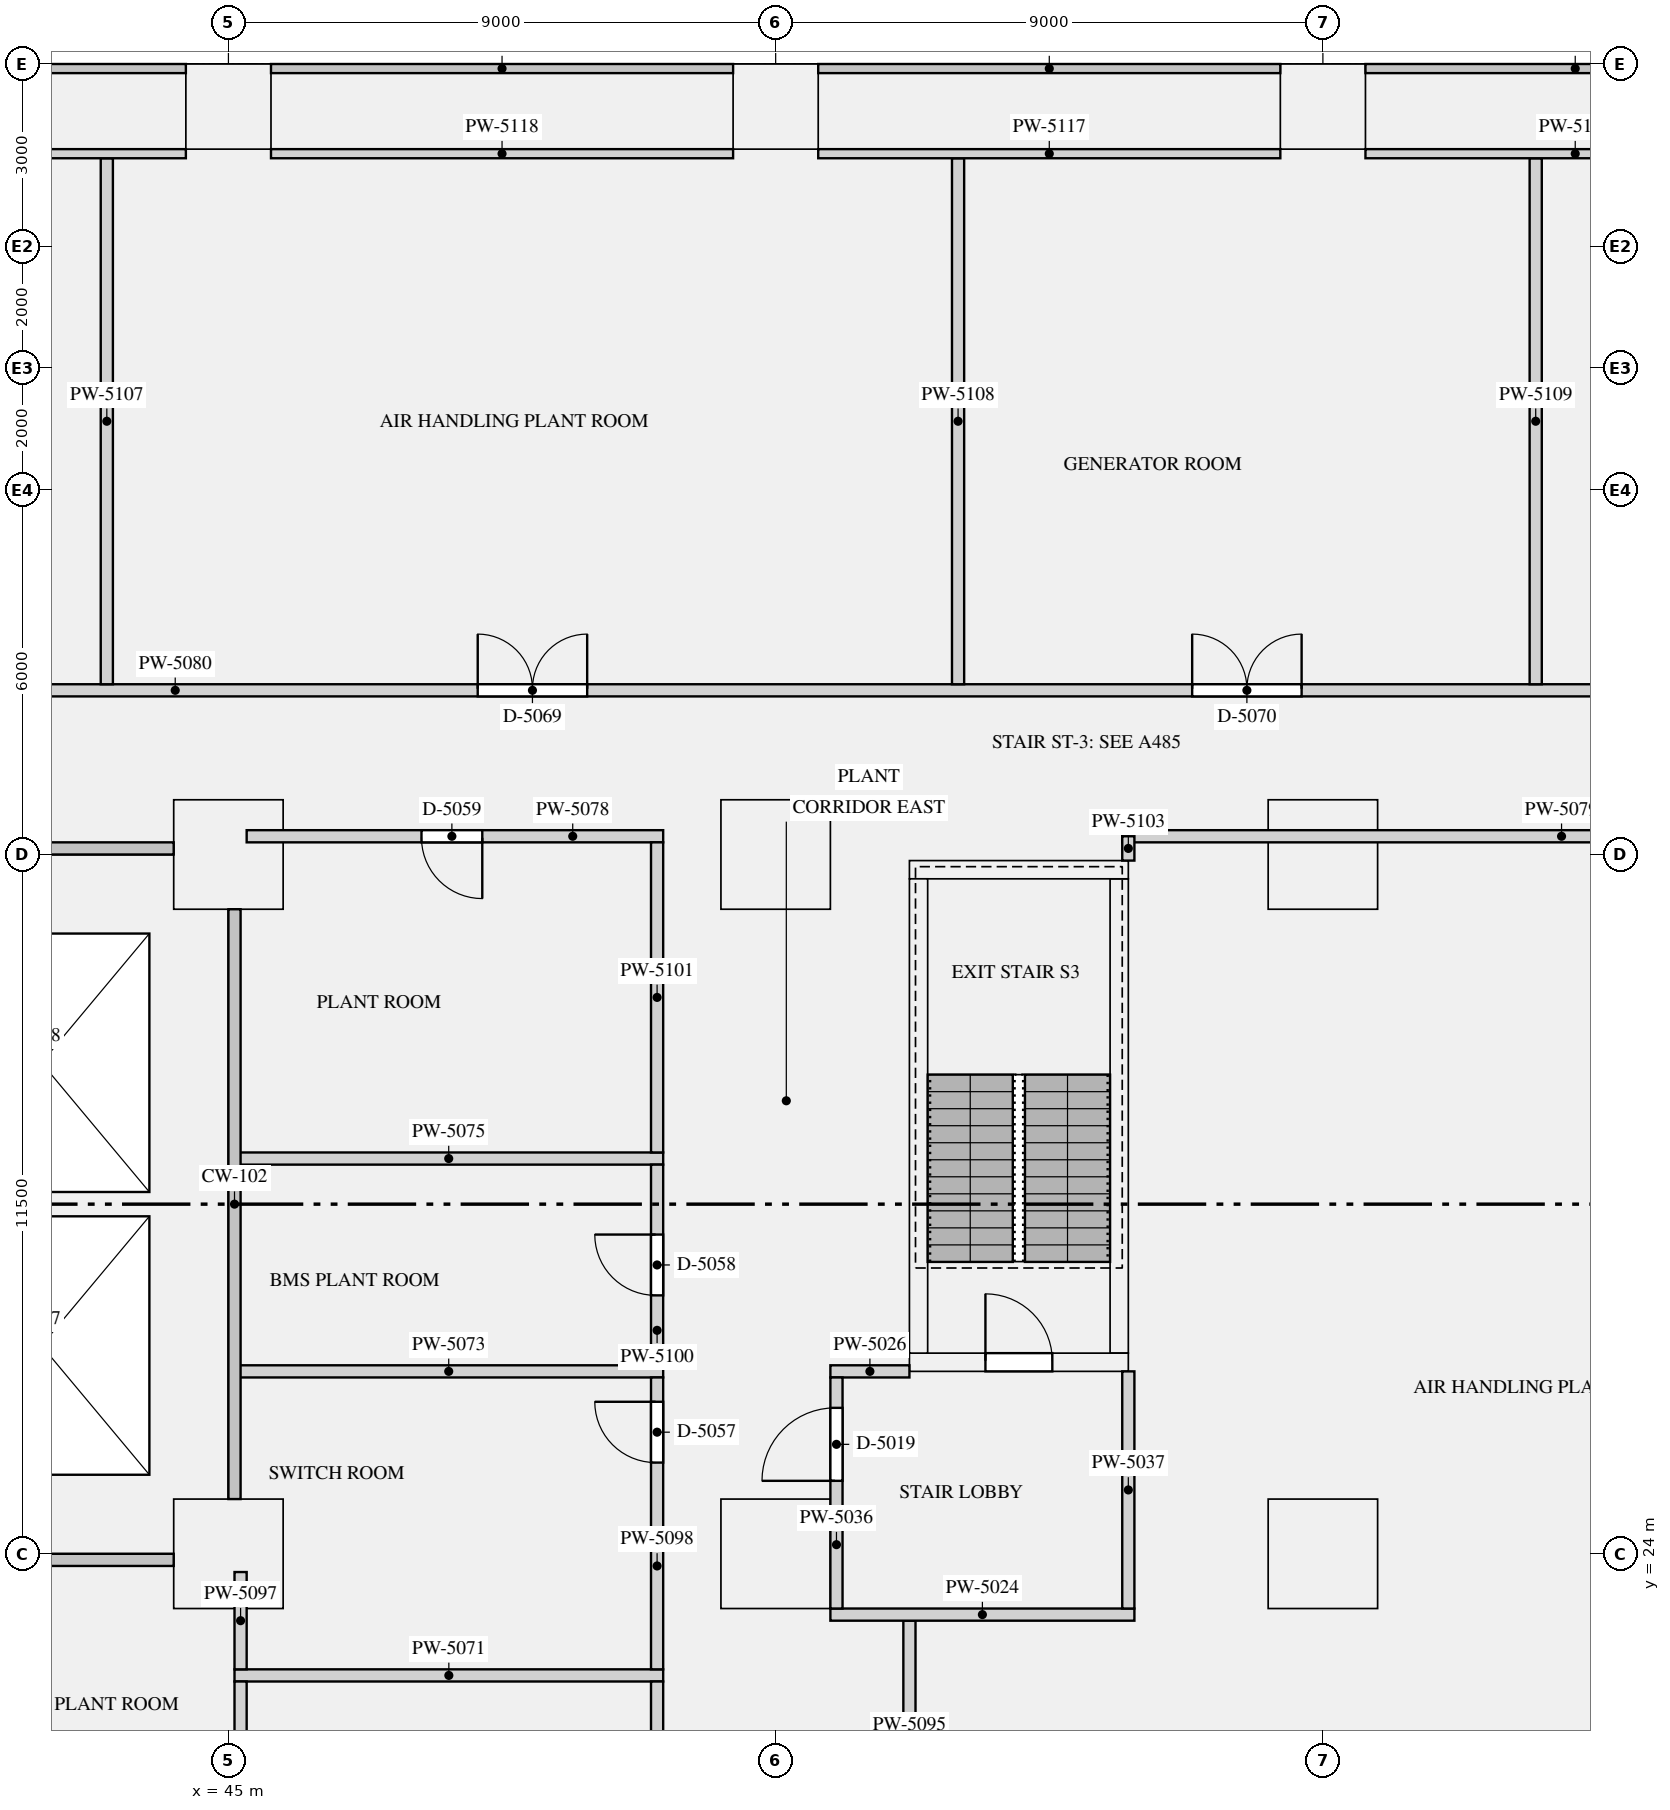
"""IFC4 building model, lengths in metres.
Left out: names, types, materials, properties, quantities, classifications, styles, units other than length and angle.
Written with IfcOpenShell. Run it as: python <this file> out.ifc"""

import sys

from ifc_helpers import new_model, si_unit, direction, frame, frame_2d, origin, origin_2d, place, context, subcontext, project, spatial, rectangle, extrude, element, fill, save


model = new_model("IFC4")
c1 = context("Model", 3, precision=1e-05, world=origin(), true_north=direction((0.0, 1.0)))
c2 = subcontext(c1, "Body", "Model", "MODEL_VIEW")
j1 = project(units=[si_unit("LENGTHUNIT", "METRE"), si_unit("PLANEANGLEUNIT", "RADIAN")], contexts=[c1])
p1 = place(None, origin())
s1 = spatial("IfcSite", under=j1, at=p1, CompositionType="ELEMENT")
p2 = place(p1, origin())
s2 = spatial("IfcBuilding", under=s1, at=p2, CompositionType="ELEMENT")
p3 = place(p2, frame((0.0, 0.0, 15.5)))
s3 = spatial("IfcBuildingStorey", under=s2, at=p3, CompositionType="ELEMENT", Elevation=15.5)
for number, where, z_axis, x_axis in (
    (1, (63.0, 47.8, 0.0), (0.0, 0.0, 1.0), (-1.0, 0.0, 0.0)),
    (2, (54.0, 47.8, 0.0), (0.0, 0.0, 1.0), (-1.0, 0.0, 0.0)),
    (3, (45.0, 47.8, 0.0), (0.0, 0.0, 1.0), (-1.0, 0.0, 0.0)),
):
    element("IfcColumn", number, at=place(p3, frame(where, z_axis=z_axis, x_axis=x_axis)), inside=s3, PredefinedType="USERDEFINED", context=c2, shape_type="SweptSolid", body=[
        extrude(rectangle(XDim=1.4, YDim=1.4, at=origin_2d()), origin(), (0.0, 0.0, 1.0), 4.0),
    ])
for number, where, z_axis, x_axis in (
    (4, (45.0, 24.0, 0.0), (0.0, 0.0, 1.0), (1.0, 0.0, 0.0)),
    (5, (45.0, 35.5, 0.0), (0.0, 0.0, 1.0), (1.0, 0.0, 0.0)),
    (6, (54.0, 24.0, 0.0), (0.0, 0.0, 1.0), (1.0, 0.0, 0.0)),
    (7, (54.0, 35.5, 0.0), (0.0, 0.0, 1.0), (1.0, 0.0, 0.0)),
    (8, (63.0, 24.0, 0.0), (0.0, 0.0, 1.0), (1.0, 0.0, 0.0)),
    (9, (63.0, 35.5, 0.0), (0.0, 0.0, 1.0), (1.0, 0.0, 0.0)),
):
    element("IfcColumn", number, at=place(p3, frame(where, z_axis=z_axis, x_axis=x_axis)), inside=s3, PredefinedType="COLUMN", context=c2, shape_type="SweptSolid", body=[
        extrude(rectangle(XDim=1.8, YDim=1.8, at=origin_2d()), origin(), (0.0, 0.0, 1.0), 4.0),
    ])
p4 = place(p3, frame((56.2, 27.15, 0.0), z_axis=(0.0, 0.0, 1.0), x_axis=(1.0, 0.0, 0.0)))
e10 = element("IfcWall", 10, at=p4, inside=s3, PredefinedType="SHEAR", context=c2, shape_type="SweptSolid", body=[
    extrude(rectangle(XDim=3.6, YDim=0.3, at=frame_2d((1.8, 0.0))), origin(), (0.0, 0.0, 1.0), 4.0),
])
p5 = place(p4, frame((1.25, 0.0, 0.0)))
e11 = element("IfcOpeningElement", 11, at=p5, cuts=e10, PredefinedType="OPENING", context=c2, shape_type="SweptSolid", body=[
    extrude(rectangle(XDim=1.1, YDim=2.1, at=frame_2d((0.55, 1.05))), frame((0.0, 0.16, 0.0), z_axis=(0.0, -1.0, 0.0), x_axis=(1.0, 0.0, 0.0)), (0.0, 0.0, 1.0), 0.32),
])
p6 = place(p3, frame((56.2, 35.25, 0.0), z_axis=(0.0, 0.0, 1.0), x_axis=(1.0, 0.0, 0.0)))
e12 = element("IfcWall", 12, at=p6, inside=s3, PredefinedType="SHEAR", context=c2, shape_type="SweptSolid", body=[
    extrude(rectangle(XDim=3.6, YDim=0.3, at=frame_2d((1.8, 0.0))), origin(), (0.0, 0.0, 1.0), 4.0),
])
for number, where, z_axis, x_axis in (
    (13, (56.35, 27.3, 0.0), (0.0, 0.0, 1.0), (0.0, 1.0, 0.0)),
    (14, (59.65, 27.3, 0.0), (0.0, 0.0, 1.0), (0.0, 1.0, 0.0)),
):
    element("IfcWall", number, at=place(p3, frame(where, z_axis=z_axis, x_axis=x_axis)), inside=s3, PredefinedType="SHEAR", context=c2, shape_type="SweptSolid", body=[
        extrude(rectangle(XDim=7.8, YDim=0.3, at=frame_2d((3.9, 0.0))), origin(), (0.0, 0.0, 1.0), 4.0),
    ])
p7 = place(p3, frame((54.9, 23.0, 0.0), z_axis=(0.0, 0.0, 1.0), x_axis=(1.0, 0.0, 0.0)))
e15 = element("IfcWall", 15, at=p7, inside=s3, PredefinedType="PARTITIONING", context=c2, shape_type="SweptSolid", body=[
    extrude(rectangle(XDim=5.0, YDim=0.2, at=frame_2d((2.5, 0.0))), origin(), (0.0, 0.0, 1.0), 3.68),
])
p8 = place(p3, frame((54.9, 27.0, 0.0), z_axis=(0.0, 0.0, 1.0), x_axis=(1.0, 0.0, 0.0)))
e16 = element("IfcWall", 16, at=p8, inside=s3, PredefinedType="PARTITIONING", context=c2, shape_type="SweptSolid", body=[
    extrude(rectangle(XDim=1.3, YDim=0.2, at=frame_2d((0.65, 0.0))), origin(), (0.0, 0.0, 1.0), 3.68),
])
p9 = place(p3, frame((55.0, 23.1, 0.0), z_axis=(0.0, 0.0, 1.0), x_axis=(0.0, 1.0, 0.0)))
e17 = element("IfcWall", 17, at=p9, inside=s3, PredefinedType="PARTITIONING", context=c2, shape_type="SweptSolid", body=[
    extrude(rectangle(XDim=3.8, YDim=0.2, at=frame_2d((1.9, 0.0))), origin(), (0.0, 0.0, 1.0), 3.68),
])
p10 = place(p9, frame((2.1, 0.0, 0.0)))
e18 = element("IfcOpeningElement", 18, at=p10, cuts=e17, PredefinedType="OPENING", context=c2, shape_type="SweptSolid", body=[
    extrude(rectangle(XDim=1.2, YDim=2.1, at=frame_2d((0.6, 1.05))), frame((0.0, 0.11, 0.0), z_axis=(0.0, -1.0, 0.0), x_axis=(1.0, 0.0, 0.0)), (0.0, 0.0, 1.0), 0.22),
])
p11 = place(p3, frame((59.8, 23.1, 0.0), z_axis=(0.0, 0.0, 1.0), x_axis=(0.0, 1.0, 0.0)))
e19 = element("IfcWall", 19, at=p11, inside=s3, PredefinedType="PARTITIONING", context=c2, shape_type="SweptSolid", body=[
    extrude(rectangle(XDim=3.9, YDim=0.2, at=frame_2d((1.95, 0.0))), origin(), (0.0, 0.0, 1.0), 3.68),
])
p12 = place(p3, frame((45.1, 22.0, 0.0), z_axis=(0.0, 0.0, 1.0), x_axis=(1.0, 0.0, 0.0)))
e20 = element("IfcWall", 20, at=p12, inside=s3, PredefinedType="PARTITIONING", context=c2, shape_type="SweptSolid", body=[
    extrude(rectangle(XDim=7.05, YDim=0.2, at=frame_2d((3.525, 0.0))), origin(), (0.0, 0.0, 1.0), 3.68),
])
for number, where, z_axis, x_axis in (
    (21, (45.096, 27.0, 0.0), (0.0, 0.0, 1.0), (1.0, 0.0, 0.0)),
    (22, (45.096, 30.5, 0.0), (0.0, 0.0, 1.0), (1.0, 0.0, 0.0)),
):
    element("IfcWall", number, at=place(p3, frame(where, z_axis=z_axis, x_axis=x_axis)), inside=s3, PredefinedType="PARTITIONING", context=c2, shape_type="SweptSolid", body=[
        extrude(rectangle(XDim=7.054, YDim=0.2, at=frame_2d((3.527, 0.0))), origin(), (0.0, 0.0, 1.0), 3.68),
    ])
p13 = place(p3, frame((45.3, 35.8, 0.0), z_axis=(0.0, 0.0, 1.0), x_axis=(1.0, 0.0, 0.0)))
e23 = element("IfcWall", 23, at=p13, inside=s3, PredefinedType="PARTITIONING", context=c2, shape_type="SweptSolid", body=[
    extrude(rectangle(XDim=6.85, YDim=0.2, at=frame_2d((3.425, 0.0))), origin(), (0.0, 0.0, 1.0), 3.68),
])
p14 = place(p13, frame((2.875, 0.0, 0.0)))
e24 = element("IfcOpeningElement", 24, at=p14, cuts=e23, PredefinedType="OPENING", context=c2, shape_type="SweptSolid", body=[
    extrude(rectangle(XDim=1.0, YDim=2.1, at=frame_2d((0.5, 1.05))), frame((0.0, 0.11, 0.0), z_axis=(0.0, -1.0, 0.0), x_axis=(1.0, 0.0, 0.0)), (0.0, 0.0, 1.0), 0.22),
])
p15 = place(p3, frame((59.7, 35.8, 0.0), z_axis=(0.0, 0.0, 1.0), x_axis=(1.0, 0.0, 0.0)))
e25 = element("IfcWall", 25, at=p15, inside=s3, PredefinedType="PARTITIONING", context=c2, shape_type="SweptSolid", body=[
    extrude(rectangle(XDim=14.45, YDim=0.2, at=frame_2d((7.225, 0.0))), origin(), (0.0, 0.0, 1.0), 3.68),
])
p16 = place(p3, frame((2.35, 38.2, 0.0), z_axis=(0.0, 0.0, 1.0), x_axis=(1.0, 0.0, 0.0)))
e26 = element("IfcWall", 26, at=p16, inside=s3, PredefinedType="PARTITIONING", context=c2, shape_type="SweptSolid", body=[
    extrude(rectangle(XDim=71.8, YDim=0.2, at=frame_2d((35.9, 0.0))), origin(), (0.0, 0.0, 1.0), 3.68),
])
p17 = place(p16, frame((4.65, 0.0, 0.0)))
e27 = element("IfcOpeningElement", 27, at=p17, cuts=e26, PredefinedType="OPENING", context=c2, shape_type="SweptSolid", body=[
    extrude(rectangle(XDim=1.8, YDim=2.1, at=frame_2d((0.9, 1.05))), frame((0.0, 0.11, 0.0), z_axis=(0.0, -1.0, 0.0), x_axis=(1.0, 0.0, 0.0)), (0.0, 0.0, 1.0), 0.22),
])
p18 = place(p16, frame((16.25, 0.0, 0.0)))
e28 = element("IfcOpeningElement", 28, at=p18, cuts=e26, PredefinedType="OPENING", context=c2, shape_type="SweptSolid", body=[
    extrude(rectangle(XDim=1.8, YDim=2.1, at=frame_2d((0.9, 1.05))), frame((0.0, 0.11, 0.0), z_axis=(0.0, -1.0, 0.0), x_axis=(1.0, 0.0, 0.0)), (0.0, 0.0, 1.0), 0.22),
])
p19 = place(p16, frame((25.5, 0.0, 0.0)))
e29 = element("IfcOpeningElement", 29, at=p19, cuts=e26, PredefinedType="OPENING", context=c2, shape_type="SweptSolid", body=[
    extrude(rectangle(XDim=1.8, YDim=2.1, at=frame_2d((0.9, 1.05))), frame((0.0, 0.11, 0.0), z_axis=(0.0, -1.0, 0.0), x_axis=(1.0, 0.0, 0.0)), (0.0, 0.0, 1.0), 0.22),
])
p20 = place(p16, frame((35.0, 0.0, 0.0)))
e30 = element("IfcOpeningElement", 30, at=p20, cuts=e26, PredefinedType="OPENING", context=c2, shape_type="SweptSolid", body=[
    extrude(rectangle(XDim=1.8, YDim=2.1, at=frame_2d((0.9, 1.05))), frame((0.0, 0.11, 0.0), z_axis=(0.0, -1.0, 0.0), x_axis=(1.0, 0.0, 0.0)), (0.0, 0.0, 1.0), 0.22),
])
p21 = place(p16, frame((46.75, 0.0, 0.0)))
e31 = element("IfcOpeningElement", 31, at=p21, cuts=e26, PredefinedType="OPENING", context=c2, shape_type="SweptSolid", body=[
    extrude(rectangle(XDim=1.8, YDim=2.1, at=frame_2d((0.9, 1.05))), frame((0.0, 0.11, 0.0), z_axis=(0.0, -1.0, 0.0), x_axis=(1.0, 0.0, 0.0)), (0.0, 0.0, 1.0), 0.22),
])
p22 = place(p16, frame((58.5, 0.0, 0.0)))
e32 = element("IfcOpeningElement", 32, at=p22, cuts=e26, PredefinedType="OPENING", context=c2, shape_type="SweptSolid", body=[
    extrude(rectangle(XDim=1.8, YDim=2.1, at=frame_2d((0.9, 1.05))), frame((0.0, 0.11, 0.0), z_axis=(0.0, -1.0, 0.0), x_axis=(1.0, 0.0, 0.0)), (0.0, 0.0, 1.0), 0.22),
])
p23 = place(p16, frame((67.85, 0.0, 0.0)))
e33 = element("IfcOpeningElement", 33, at=p23, cuts=e26, PredefinedType="OPENING", context=c2, shape_type="SweptSolid", body=[
    extrude(rectangle(XDim=1.8, YDim=2.1, at=frame_2d((0.9, 1.05))), frame((0.0, 0.11, 0.0), z_axis=(0.0, -1.0, 0.0), x_axis=(1.0, 0.0, 0.0)), (0.0, 0.0, 1.0), 0.22),
])
for number, where, z_axis, x_axis in (
    (34, (45.2, 18.6, 0.0), (0.0, 0.0, 1.0), (0.0, 1.0, 0.0)),
    (35, (52.05, 18.6, 0.0), (0.0, 0.0, 1.0), (0.0, 1.0, 0.0)),
):
    element("IfcWall", number, at=place(p3, frame(where, z_axis=z_axis, x_axis=x_axis)), inside=s3, PredefinedType="PARTITIONING", context=c2, shape_type="SweptSolid", body=[
        extrude(rectangle(XDim=3.3, YDim=0.2, at=frame_2d((1.65, 0.0))), origin(), (0.0, 0.0, 1.0), 3.68),
    ])
p24 = place(p3, frame((56.2, 18.6, 0.0), z_axis=(0.0, 0.0, 1.0), x_axis=(0.0, 1.0, 0.0)))
e36 = element("IfcWall", 36, at=p24, inside=s3, PredefinedType="PARTITIONING", context=c2, shape_type="SweptSolid", body=[
    extrude(rectangle(XDim=4.3, YDim=0.2, at=frame_2d((2.15, 0.0))), origin(), (0.0, 0.0, 1.0), 3.68),
])
p25 = place(p3, frame((45.2, 22.1, 0.0), z_axis=(0.0, 0.0, 1.0), x_axis=(0.0, 1.0, 0.0)))
e37 = element("IfcWall", 37, at=p25, inside=s3, PredefinedType="PARTITIONING", context=c2, shape_type="SweptSolid", body=[
    extrude(rectangle(XDim=1.6, YDim=0.2, at=frame_2d((0.8, 0.0))), origin(), (0.0, 0.0, 1.0), 3.68),
])
p26 = place(p3, frame((52.05, 22.1, 0.0), z_axis=(0.0, 0.0, 1.0), x_axis=(0.0, 1.0, 0.0)))
e38 = element("IfcWall", 38, at=p26, inside=s3, PredefinedType="PARTITIONING", context=c2, shape_type="SweptSolid", body=[
    extrude(rectangle(XDim=4.8, YDim=0.2, at=frame_2d((2.4, 0.0))), origin(), (0.0, 0.0, 1.0), 3.68),
])
p27 = place(p26, frame((3.4, 0.0, 0.0)))
e39 = element("IfcOpeningElement", 39, at=p27, cuts=e38, PredefinedType="OPENING", context=c2, shape_type="SweptSolid", body=[
    extrude(rectangle(XDim=1.0, YDim=2.1, at=frame_2d((0.5, 1.05))), frame((0.0, 0.11, 0.0), z_axis=(0.0, -1.0, 0.0), x_axis=(1.0, 0.0, 0.0)), (0.0, 0.0, 1.0), 0.22),
])
p28 = place(p3, frame((52.05, 27.1, 0.0), z_axis=(0.0, 0.0, 1.0), x_axis=(0.0, 1.0, 0.0)))
e40 = element("IfcWall", 40, at=p28, inside=s3, PredefinedType="PARTITIONING", context=c2, shape_type="SweptSolid", body=[
    extrude(rectangle(XDim=3.3, YDim=0.2, at=frame_2d((1.65, 0.0))), origin(), (0.0, 0.0, 1.0), 3.68),
])
p29 = place(p28, frame((1.15, 0.0, 0.0)))
e41 = element("IfcOpeningElement", 41, at=p29, cuts=e40, PredefinedType="OPENING", context=c2, shape_type="SweptSolid", body=[
    extrude(rectangle(XDim=1.0, YDim=2.1, at=frame_2d((0.5, 1.05))), frame((0.0, 0.11, 0.0), z_axis=(0.0, -1.0, 0.0), x_axis=(1.0, 0.0, 0.0)), (0.0, 0.0, 1.0), 0.22),
])
p30 = place(p3, frame((52.05, 30.6, 0.0), z_axis=(0.0, 0.0, 1.0), x_axis=(0.0, 1.0, 0.0)))
e42 = element("IfcWall", 42, at=p30, inside=s3, PredefinedType="PARTITIONING", context=c2, shape_type="SweptSolid", body=[
    extrude(rectangle(XDim=5.1, YDim=0.2, at=frame_2d((2.55, 0.0))), origin(), (0.0, 0.0, 1.0), 3.68),
])
p31 = place(p3, frame((59.8, 35.4, 0.0), z_axis=(0.0, 0.0, 1.0), x_axis=(0.0, 1.0, 0.0)))
e43 = element("IfcWall", 43, at=p31, inside=s3, PredefinedType="PARTITIONING", context=c2, shape_type="SweptSolid", body=[
    extrude(rectangle(XDim=0.4, YDim=0.2, at=frame_2d((0.2, 0.0))), origin(), (0.0, 0.0, 1.0), 3.68),
])
for number, where, z_axis, x_axis in (
    (44, (43.0, 38.3, 0.0), (0.0, 0.0, 1.0), (0.0, 1.0, 0.0)),
    (45, (57.0, 38.3, 0.0), (0.0, 0.0, 1.0), (0.0, 1.0, 0.0)),
    (46, (66.5, 38.3, 0.0), (0.0, 0.0, 1.0), (0.0, 1.0, 0.0)),
):
    element("IfcWall", number, at=place(p3, frame(where, z_axis=z_axis, x_axis=x_axis)), inside=s3, PredefinedType="PARTITIONING", context=c2, shape_type="SweptSolid", body=[
        extrude(rectangle(XDim=8.65, YDim=0.2, at=frame_2d((4.325, 0.0))), origin(), (0.0, 0.0, 1.0), 3.68),
    ])
p32 = place(p3, frame((63.7, 47.025, 0.0), z_axis=(0.0, 0.0, 1.0), x_axis=(1.0, 0.0, 0.0)))
e47 = element("IfcWall", 47, at=p32, inside=s3, PredefinedType="PARTITIONING", context=c2, shape_type="SweptSolid", body=[
    extrude(rectangle(XDim=6.9, YDim=0.15, at=frame_2d((3.45, 0.0))), origin(), (0.0, 0.0, 1.0), 3.68),
])
for number, where, z_axis, x_axis in (
    (48, (54.7, 47.025, 0.0), (0.0, 0.0, 1.0), (1.0, 0.0, 0.0)),
    (49, (45.7, 47.025, 0.0), (0.0, 0.0, 1.0), (1.0, 0.0, 0.0)),
    (50, (36.7, 47.025, 0.0), (0.0, 0.0, 1.0), (1.0, 0.0, 0.0)),
):
    element("IfcWall", number, at=place(p3, frame(where, z_axis=z_axis, x_axis=x_axis)), inside=s3, PredefinedType="PARTITIONING", context=c2, shape_type="SweptSolid", body=[
        extrude(rectangle(XDim=7.6, YDim=0.15, at=frame_2d((3.8, 0.0))), origin(), (0.0, 0.0, 1.0), 3.68),
    ])
p33 = place(p3, frame((0.0, 0.0, -0.6)))
p34 = place(p33, frame((41.925, 27.425, 0.0)))
p35 = place(p34, frame((0.0, 0.0, 0.55)))
e51 = element("IfcWindow", 51, at=p35, inside=s3, PartitioningType="SINGLE_PANEL", PredefinedType="SKYLIGHT", context=c2, shape_type="SweptSolid", body=[
    extrude(rectangle(XDim=3.55, YDim=4.25, at=origin_2d()), origin(), (0.0, 0.0, 1.0), 0.05),
])
p36 = place(p33, frame((41.925, 32.075, 0.0)))
p37 = place(p36, frame((0.0, 0.0, 0.55)))
e52 = element("IfcWindow", 52, at=p37, inside=s3, PartitioningType="SINGLE_PANEL", PredefinedType="SKYLIGHT", context=c2, shape_type="SweptSolid", body=[
    extrude(rectangle(XDim=3.55, YDim=4.25, at=origin_2d()), origin(), (0.0, 0.0, 1.0), 0.05),
])
p38 = place(p5, origin())
e53 = element("IfcDoor", 53, at=p38, inside=s3, OperationType="SINGLE_SWING_LEFT", PredefinedType="DOOR", context=c2, shape_type="SweptSolid", body=[
    extrude(rectangle(XDim=1.1, YDim=2.1, at=frame_2d((0.55, 1.05))), frame((0.0, 0.025, 0.0), z_axis=(0.0, -1.0, 0.0), x_axis=(1.0, 0.0, 0.0)), (0.0, 0.0, 1.0), 0.05),
])
fill(e11, e53)
p39 = place(p10, origin())
e54 = element("IfcDoor", 54, at=p39, inside=s3, OperationType="SINGLE_SWING_LEFT", PredefinedType="DOOR", context=c2, shape_type="SweptSolid", body=[
    extrude(rectangle(XDim=1.2, YDim=2.1, at=frame_2d((0.6, 1.05))), frame((0.0, 0.025, 0.0), z_axis=(0.0, -1.0, 0.0), x_axis=(1.0, 0.0, 0.0)), (0.0, 0.0, 1.0), 0.05),
])
fill(e18, e54)
p40 = place(p27, origin())
e55 = element("IfcDoor", 55, at=p40, inside=s3, OperationType="SINGLE_SWING_RIGHT", PredefinedType="DOOR", context=c2, shape_type="SweptSolid", body=[
    extrude(rectangle(XDim=1.0, YDim=2.1, at=frame_2d((0.5, 1.05))), frame((0.0, 0.025, 0.0), z_axis=(0.0, -1.0, 0.0), x_axis=(1.0, 0.0, 0.0)), (0.0, 0.0, 1.0), 0.05),
])
fill(e39, e55)
p41 = place(p29, origin())
e56 = element("IfcDoor", 56, at=p41, inside=s3, OperationType="SINGLE_SWING_RIGHT", PredefinedType="DOOR", context=c2, shape_type="SweptSolid", body=[
    extrude(rectangle(XDim=1.0, YDim=2.1, at=frame_2d((0.5, 1.05))), frame((0.0, 0.025, 0.0), z_axis=(0.0, -1.0, 0.0), x_axis=(1.0, 0.0, 0.0)), (0.0, 0.0, 1.0), 0.05),
])
fill(e41, e56)
p42 = place(p14, frame((1.0, 0.0, 0.0), z_axis=(0.0, 0.0, 1.0), x_axis=(-1.0, 0.0, 0.0)))
e57 = element("IfcDoor", 57, at=p42, inside=s3, OperationType="SINGLE_SWING_LEFT", PredefinedType="DOOR", context=c2, shape_type="SweptSolid", body=[
    extrude(rectangle(XDim=1.0, YDim=2.1, at=frame_2d((0.5, 1.05))), frame((0.0, 0.025, 0.0), z_axis=(0.0, -1.0, 0.0), x_axis=(1.0, 0.0, 0.0)), (0.0, 0.0, 1.0), 0.05),
])
fill(e24, e57)
p43 = place(p21, origin())
e58 = element("IfcDoor", 58, at=p43, inside=s3, OperationType="DOUBLE_DOOR_SINGLE_SWING", PredefinedType="DOOR", context=c2, shape_type="SweptSolid", body=[
    extrude(rectangle(XDim=1.8, YDim=2.1, at=frame_2d((0.9, 1.05))), frame((0.0, 0.025, 0.0), z_axis=(0.0, -1.0, 0.0), x_axis=(1.0, 0.0, 0.0)), (0.0, 0.0, 1.0), 0.05),
])
fill(e31, e58)
p44 = place(p22, origin())
e59 = element("IfcDoor", 59, at=p44, inside=s3, OperationType="DOUBLE_DOOR_SINGLE_SWING", PredefinedType="DOOR", context=c2, shape_type="SweptSolid", body=[
    extrude(rectangle(XDim=1.8, YDim=2.1, at=frame_2d((0.9, 1.05))), frame((0.0, 0.025, 0.0), z_axis=(0.0, -1.0, 0.0), x_axis=(1.0, 0.0, 0.0)), (0.0, 0.0, 1.0), 0.05),
])
fill(e32, e59)
save(model, sys.argv[1])
